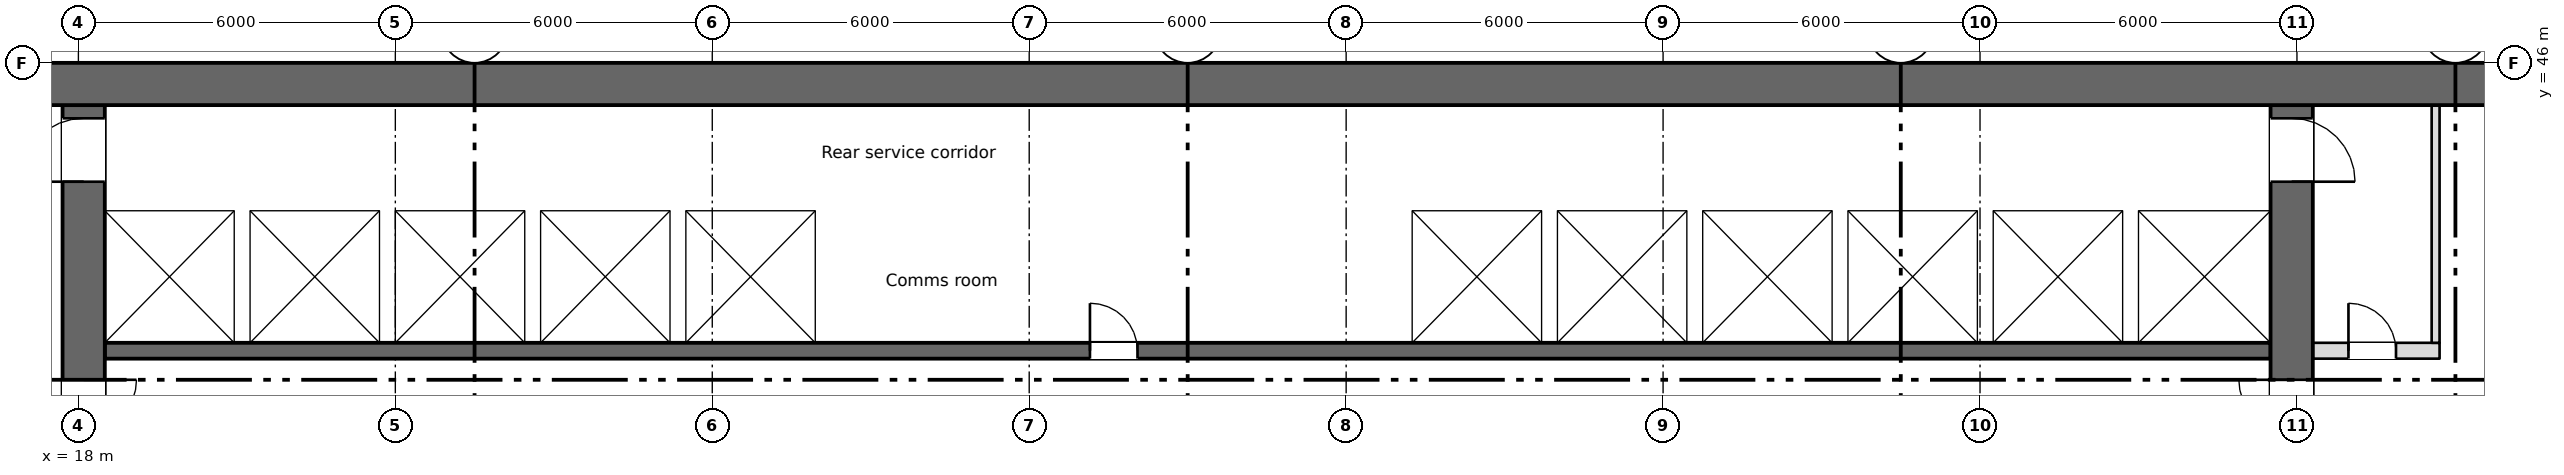
"""IFC4 building model, lengths in metres.
Left out: names, types, materials, properties, quantities, classifications, styles, units other than length and angle.
Written with IfcOpenShell. Run it as: python <this file> out.ifc"""

import sys

from ifc_helpers import new_model, si_unit, direction, frame, frame_2d, origin, place, context, subcontext, project, spatial, rectangle, extrude, element, fill, save


model = new_model("IFC4")
c1 = context("Model", 3, precision=1e-05, world=origin(), true_north=direction((0.0, 1.0)))
c2 = subcontext(c1, "Body", "Model", "MODEL_VIEW")
j1 = project(units=[si_unit("LENGTHUNIT", "METRE"), si_unit("PLANEANGLEUNIT", "RADIAN")], contexts=[c1])
p1 = place(None, origin())
s1 = spatial("IfcSite", under=j1, at=p1, CompositionType="ELEMENT")
p2 = place(p1, origin())
s2 = spatial("IfcBuilding", under=s1, at=p2, CompositionType="ELEMENT")
p3 = place(p2, frame((0.0, 0.0, 106.25)))
s3 = spatial("IfcBuildingStorey", under=s2, at=p3, CompositionType="ELEMENT", Elevation=106.25)
p4 = place(p3, frame((5.55, 45.6, 0.0), z_axis=(0.0, 0.0, 1.0), x_axis=(1.0, 0.0, 0.0)))
e1 = element("IfcWall", 1, at=p4, inside=s3, PredefinedType="SHEAR", context=c2, shape_type="SweptSolid", body=[
    extrude(rectangle(XDim=60.9, YDim=0.8, at=frame_2d((30.45, 0.0))), origin(), (0.0, 0.0, 1.0), 3.35),
])
p5 = place(p4, frame((1.2, 0.0, 0.6)))
e2 = element("IfcOpeningElement", 2, at=p5, cuts=e1, PredefinedType="OPENING", context=c2, shape_type="SweptSolid", body=[
    extrude(rectangle(XDim=0.6, YDim=2.4, at=frame_2d((0.3, 1.2))), frame((0.0, 0.41, 0.0), z_axis=(0.0, -1.0, 0.0), x_axis=(1.0, 0.0, 0.0)), (0.0, 0.0, 1.0), 0.82),
])
p6 = place(p4, frame((7.2, 0.0, 0.6)))
e3 = element("IfcOpeningElement", 3, at=p6, cuts=e1, PredefinedType="OPENING", context=c2, shape_type="SweptSolid", body=[
    extrude(rectangle(XDim=0.6, YDim=2.4, at=frame_2d((0.3, 1.2))), frame((0.0, 0.41, 0.0), z_axis=(0.0, -1.0, 0.0), x_axis=(1.0, 0.0, 0.0)), (0.0, 0.0, 1.0), 0.82),
])
p7 = place(p3, frame((18.1, 28.4, 0.0), z_axis=(0.0, 0.0, 1.0), x_axis=(0.0, 1.0, 0.0)))
e4 = element("IfcWall", 4, at=p7, inside=s3, PredefinedType="SHEAR", context=c2, shape_type="SweptSolid", body=[
    extrude(rectangle(XDim=16.8, YDim=0.8, at=frame_2d((8.4, 0.0))), origin(), (0.0, 0.0, 1.0), 3.35),
])
p8 = place(p7, frame((9.6, 0.0, 0.0)))
e5 = element("IfcOpeningElement", 5, at=p8, cuts=e4, PredefinedType="OPENING", context=c2, shape_type="SweptSolid", body=[
    extrude(rectangle(XDim=2.0, YDim=2.1, at=frame_2d((1.0, 1.05))), frame((0.0, 0.41, 0.0), z_axis=(0.0, -1.0, 0.0), x_axis=(1.0, 0.0, 0.0)), (0.0, 0.0, 1.0), 0.82),
])
p9 = place(p7, frame((15.35, 0.0, 0.0)))
e6 = element("IfcOpeningElement", 6, at=p9, cuts=e4, PredefinedType="OPENING", context=c2, shape_type="SweptSolid", body=[
    extrude(rectangle(XDim=1.2, YDim=2.1, at=frame_2d((0.6, 1.05))), frame((0.0, 0.41, 0.0), z_axis=(0.0, -1.0, 0.0), x_axis=(1.0, 0.0, 0.0)), (0.0, 0.0, 1.0), 0.82),
])
p10 = place(p3, frame((59.9, 28.4, 0.0), z_axis=(0.0, 0.0, 1.0), x_axis=(0.0, 1.0, 0.0)))
e7 = element("IfcWall", 7, at=p10, inside=s3, PredefinedType="SHEAR", context=c2, shape_type="SweptSolid", body=[
    extrude(rectangle(XDim=16.8, YDim=0.8, at=frame_2d((8.4, 0.0))), origin(), (0.0, 0.0, 1.0), 3.35),
])
p11 = place(p10, frame((9.6, 0.0, 0.0)))
e8 = element("IfcOpeningElement", 8, at=p11, cuts=e7, PredefinedType="OPENING", context=c2, shape_type="SweptSolid", body=[
    extrude(rectangle(XDim=2.0, YDim=2.1, at=frame_2d((1.0, 1.05))), frame((0.0, 0.41, 0.0), z_axis=(0.0, -1.0, 0.0), x_axis=(1.0, 0.0, 0.0)), (0.0, 0.0, 1.0), 0.82),
])
p12 = place(p10, frame((15.35, 0.0, 0.0)))
e9 = element("IfcOpeningElement", 9, at=p12, cuts=e7, PredefinedType="OPENING", context=c2, shape_type="SweptSolid", body=[
    extrude(rectangle(XDim=1.2, YDim=2.1, at=frame_2d((0.6, 1.05))), frame((0.0, 0.41, 0.0), z_axis=(0.0, -1.0, 0.0), x_axis=(1.0, 0.0, 0.0)), (0.0, 0.0, 1.0), 0.82),
])
p13 = place(p3, frame((18.5, 40.55, 0.0), z_axis=(0.0, 0.0, 1.0), x_axis=(1.0, 0.0, 0.0)))
e10 = element("IfcWall", 10, at=p13, inside=s3, PredefinedType="SHEAR", context=c2, shape_type="SweptSolid", body=[
    extrude(rectangle(XDim=41.0, YDim=0.3, at=frame_2d((20.5, 0.0))), origin(), (0.0, 0.0, 1.0), 3.35),
])
p14 = place(p13, frame((18.65, 0.0, 0.0)))
e11 = element("IfcOpeningElement", 11, at=p14, cuts=e10, PredefinedType="OPENING", context=c2, shape_type="SweptSolid", body=[
    extrude(rectangle(XDim=0.9, YDim=2.1, at=frame_2d((0.45, 1.05))), frame((0.0, 0.16, 0.0), z_axis=(0.0, -1.0, 0.0), x_axis=(1.0, 0.0, 0.0)), (0.0, 0.0, 1.0), 0.32),
])
p15 = place(p13, frame((6.175, 0.0, 0.0)))
e12 = element("IfcOpeningElement", 12, at=p15, cuts=e10, PredefinedType="OPENING", context=c2, shape_type="SweptSolid", body=[
    extrude(rectangle(XDim=1.1, YDim=2.1, at=frame_2d((0.55, 1.05))), frame((0.0, 0.16, 0.0), z_axis=(0.0, -1.0, 0.0), x_axis=(1.0, 0.0, 0.0)), (0.0, 0.0, 1.0), 0.32),
])
p16 = place(p13, frame((8.925, 0.0, 0.0)))
e13 = element("IfcOpeningElement", 13, at=p16, cuts=e10, PredefinedType="OPENING", context=c2, shape_type="SweptSolid", body=[
    extrude(rectangle(XDim=1.1, YDim=2.1, at=frame_2d((0.55, 1.05))), frame((0.0, 0.16, 0.0), z_axis=(0.0, -1.0, 0.0), x_axis=(1.0, 0.0, 0.0)), (0.0, 0.0, 1.0), 0.32),
])
p17 = place(p13, frame((11.675, 0.0, 0.0)))
e14 = element("IfcOpeningElement", 14, at=p17, cuts=e10, PredefinedType="OPENING", context=c2, shape_type="SweptSolid", body=[
    extrude(rectangle(XDim=1.1, YDim=2.1, at=frame_2d((0.55, 1.05))), frame((0.0, 0.16, 0.0), z_axis=(0.0, -1.0, 0.0), x_axis=(1.0, 0.0, 0.0)), (0.0, 0.0, 1.0), 0.32),
])
p18 = place(p13, frame((30.925, 0.0, 0.0)))
e15 = element("IfcOpeningElement", 15, at=p18, cuts=e10, PredefinedType="OPENING", context=c2, shape_type="SweptSolid", body=[
    extrude(rectangle(XDim=1.1, YDim=2.1, at=frame_2d((0.55, 1.05))), frame((0.0, 0.16, 0.0), z_axis=(0.0, -1.0, 0.0), x_axis=(1.0, 0.0, 0.0)), (0.0, 0.0, 1.0), 0.32),
])
p19 = place(p13, frame((33.675, 0.0, 0.0)))
e16 = element("IfcOpeningElement", 16, at=p19, cuts=e10, PredefinedType="OPENING", context=c2, shape_type="SweptSolid", body=[
    extrude(rectangle(XDim=1.1, YDim=2.1, at=frame_2d((0.55, 1.05))), frame((0.0, 0.16, 0.0), z_axis=(0.0, -1.0, 0.0), x_axis=(1.0, 0.0, 0.0)), (0.0, 0.0, 1.0), 0.32),
])
p20 = place(p13, frame((36.375, 0.0, 0.0)))
e17 = element("IfcOpeningElement", 17, at=p20, cuts=e10, PredefinedType="OPENING", context=c2, shape_type="SweptSolid", body=[
    extrude(rectangle(XDim=1.2, YDim=2.1, at=frame_2d((0.6, 1.05))), frame((0.0, 0.16, 0.0), z_axis=(0.0, -1.0, 0.0), x_axis=(1.0, 0.0, 0.0)), (0.0, 0.0, 1.0), 0.32),
])
p21 = place(p13, frame((39.15, 0.0, 0.0)))
e18 = element("IfcOpeningElement", 18, at=p21, cuts=e10, PredefinedType="OPENING", context=c2, shape_type="SweptSolid", body=[
    extrude(rectangle(XDim=1.2, YDim=2.1, at=frame_2d((0.6, 1.05))), frame((0.0, 0.16, 0.0), z_axis=(0.0, -1.0, 0.0), x_axis=(1.0, 0.0, 0.0)), (0.0, 0.0, 1.0), 0.32),
])
p22 = place(p3, frame((18.5, 43.35, 0.0), z_axis=(0.0, 0.0, 1.0), x_axis=(1.0, 0.0, 0.0)))
e19 = element("IfcWall", 19, at=p22, inside=s3, PredefinedType="SHEAR", context=c2, shape_type="SweptSolid", body=[
    extrude(rectangle(XDim=41.0, YDim=0.3, at=frame_2d((20.5, 0.0))), origin(), (0.0, 0.0, 1.0), 3.35),
])
p23 = place(p3, frame((60.3, 40.55, 0.0), z_axis=(0.0, 0.0, 1.0), x_axis=(1.0, 0.0, 0.0)))
e20 = element("IfcWall", 20, at=p23, inside=s3, PredefinedType="PARTITIONING", context=c2, shape_type="SweptSolid", body=[
    extrude(rectangle(XDim=2.4, YDim=0.3, at=frame_2d((1.2, 0.0))), origin(), (0.0, 0.0, 1.0), 3.35),
])
p24 = place(p23, frame((0.675, 0.0, 0.0)))
e21 = element("IfcOpeningElement", 21, at=p24, cuts=e20, PredefinedType="OPENING", context=c2, shape_type="SweptSolid", body=[
    extrude(rectangle(XDim=0.9, YDim=2.1, at=frame_2d((0.45, 1.05))), frame((0.0, 0.16, 0.0), z_axis=(0.0, -1.0, 0.0), x_axis=(1.0, 0.0, 0.0)), (0.0, 0.0, 1.0), 0.32),
])
for number, where, z_axis, x_axis in (
    (22, (21.1, 40.7, 0.0), (0.0, 0.0, 1.0), (0.0, 1.0, 0.0)),
    (23, (23.85, 40.7, 0.0), (0.0, 0.0, 1.0), (0.0, 1.0, 0.0)),
    (24, (26.6, 40.7, 0.0), (0.0, 0.0, 1.0), (0.0, 1.0, 0.0)),
    (25, (29.35, 40.7, 0.0), (0.0, 0.0, 1.0), (0.0, 1.0, 0.0)),
    (26, (32.1, 40.7, 0.0), (0.0, 0.0, 1.0), (0.0, 1.0, 0.0)),
    (27, (43.1, 40.7, 0.0), (0.0, 0.0, 1.0), (0.0, 1.0, 0.0)),
    (28, (45.85, 40.7, 0.0), (0.0, 0.0, 1.0), (0.0, 1.0, 0.0)),
    (29, (48.6, 40.7, 0.0), (0.0, 0.0, 1.0), (0.0, 1.0, 0.0)),
    (30, (51.35, 40.7, 0.0), (0.0, 0.0, 1.0), (0.0, 1.0, 0.0)),
    (31, (54.1, 40.7, 0.0), (0.0, 0.0, 1.0), (0.0, 1.0, 0.0)),
    (32, (56.85, 40.7, 0.0), (0.0, 0.0, 1.0), (0.0, 1.0, 0.0)),
):
    element("IfcWall", number, at=place(p3, frame(where, z_axis=z_axis, x_axis=x_axis)), inside=s3, PredefinedType="SHEAR", context=c2, shape_type="SweptSolid", body=[
        extrude(rectangle(XDim=2.5, YDim=0.3, at=frame_2d((1.25, 0.0))), origin(), (0.0, 0.0, 1.0), 3.35),
    ])
p25 = place(p3, frame((62.625, 40.7, 0.0), z_axis=(0.0, 0.0, 1.0), x_axis=(0.0, 1.0, 0.0)))
e33 = element("IfcWall", 33, at=p25, inside=s3, PredefinedType="PARTITIONING", context=c2, shape_type="SweptSolid", body=[
    extrude(rectangle(XDim=4.5, YDim=0.15, at=frame_2d((2.25, 0.0))), origin(), (0.0, 0.0, 1.0), 3.35),
])
p26 = place(p24, origin())
e34 = element("IfcDoor", 34, at=p26, inside=s3, OperationType="SINGLE_SWING_LEFT", PredefinedType="DOOR", context=c2, shape_type="SweptSolid", body=[
    extrude(rectangle(XDim=0.9, YDim=2.1, at=frame_2d((0.45, 1.05))), frame((0.0, 0.025, 0.0), z_axis=(0.0, -1.0, 0.0), x_axis=(1.0, 0.0, 0.0)), (0.0, 0.0, 1.0), 0.05),
])
fill(e21, e34)
p27 = place(p14, origin())
e35 = element("IfcDoor", 35, at=p27, inside=s3, OperationType="SINGLE_SWING_LEFT", PredefinedType="DOOR", context=c2, shape_type="SweptSolid", body=[
    extrude(rectangle(XDim=0.9, YDim=2.1, at=frame_2d((0.45, 1.05))), frame((0.0, 0.025, 0.0), z_axis=(0.0, -1.0, 0.0), x_axis=(1.0, 0.0, 0.0)), (0.0, 0.0, 1.0), 0.05),
])
fill(e11, e35)
p28 = place(p15, origin())
e36 = element("IfcDoor", 36, at=p28, inside=s3, OperationType="SLIDING_TO_LEFT", PredefinedType="DOOR", context=c2, shape_type="SweptSolid", body=[
    extrude(rectangle(XDim=1.1, YDim=2.1, at=frame_2d((0.55, 1.05))), frame((0.0, 0.025, 0.0), z_axis=(0.0, -1.0, 0.0), x_axis=(1.0, 0.0, 0.0)), (0.0, 0.0, 1.0), 0.05),
])
fill(e12, e36)
p29 = place(p16, origin())
e37 = element("IfcDoor", 37, at=p29, inside=s3, OperationType="SLIDING_TO_LEFT", PredefinedType="DOOR", context=c2, shape_type="SweptSolid", body=[
    extrude(rectangle(XDim=1.1, YDim=2.1, at=frame_2d((0.55, 1.05))), frame((0.0, 0.025, 0.0), z_axis=(0.0, -1.0, 0.0), x_axis=(1.0, 0.0, 0.0)), (0.0, 0.0, 1.0), 0.05),
])
fill(e13, e37)
p30 = place(p17, origin())
e38 = element("IfcDoor", 38, at=p30, inside=s3, OperationType="SLIDING_TO_LEFT", PredefinedType="DOOR", context=c2, shape_type="SweptSolid", body=[
    extrude(rectangle(XDim=1.1, YDim=2.1, at=frame_2d((0.55, 1.05))), frame((0.0, 0.025, 0.0), z_axis=(0.0, -1.0, 0.0), x_axis=(1.0, 0.0, 0.0)), (0.0, 0.0, 1.0), 0.05),
])
fill(e14, e38)
p31 = place(p18, origin())
e39 = element("IfcDoor", 39, at=p31, inside=s3, OperationType="SLIDING_TO_LEFT", PredefinedType="DOOR", context=c2, shape_type="SweptSolid", body=[
    extrude(rectangle(XDim=1.1, YDim=2.1, at=frame_2d((0.55, 1.05))), frame((0.0, 0.025, 0.0), z_axis=(0.0, -1.0, 0.0), x_axis=(1.0, 0.0, 0.0)), (0.0, 0.0, 1.0), 0.05),
])
fill(e15, e39)
p32 = place(p19, origin())
e40 = element("IfcDoor", 40, at=p32, inside=s3, OperationType="SLIDING_TO_LEFT", PredefinedType="DOOR", context=c2, shape_type="SweptSolid", body=[
    extrude(rectangle(XDim=1.1, YDim=2.1, at=frame_2d((0.55, 1.05))), frame((0.0, 0.025, 0.0), z_axis=(0.0, -1.0, 0.0), x_axis=(1.0, 0.0, 0.0)), (0.0, 0.0, 1.0), 0.05),
])
fill(e16, e40)
p33 = place(p20, origin())
e41 = element("IfcDoor", 41, at=p33, inside=s3, OperationType="SLIDING_TO_LEFT", PredefinedType="DOOR", context=c2, shape_type="SweptSolid", body=[
    extrude(rectangle(XDim=1.2, YDim=2.1, at=frame_2d((0.6, 1.05))), frame((0.0, 0.025, 0.0), z_axis=(0.0, -1.0, 0.0), x_axis=(1.0, 0.0, 0.0)), (0.0, 0.0, 1.0), 0.05),
])
fill(e17, e41)
p34 = place(p21, origin())
e42 = element("IfcDoor", 42, at=p34, inside=s3, OperationType="SLIDING_TO_LEFT", PredefinedType="DOOR", context=c2, shape_type="SweptSolid", body=[
    extrude(rectangle(XDim=1.2, YDim=2.1, at=frame_2d((0.6, 1.05))), frame((0.0, 0.025, 0.0), z_axis=(0.0, -1.0, 0.0), x_axis=(1.0, 0.0, 0.0)), (0.0, 0.0, 1.0), 0.05),
])
fill(e18, e42)
p35 = place(p8, origin())
e43 = element("IfcDoor", 43, at=p35, inside=s3, OperationType="DOUBLE_DOOR_SINGLE_SWING", PredefinedType="DOOR", context=c2, shape_type="SweptSolid", body=[
    extrude(rectangle(XDim=2.0, YDim=2.1, at=frame_2d((1.0, 1.05))), frame((0.0, 0.025, 0.0), z_axis=(0.0, -1.0, 0.0), x_axis=(1.0, 0.0, 0.0)), (0.0, 0.0, 1.0), 0.05),
])
fill(e5, e43)
p36 = place(p11, origin())
e44 = element("IfcDoor", 44, at=p36, inside=s3, OperationType="DOUBLE_DOOR_SINGLE_SWING", PredefinedType="DOOR", context=c2, shape_type="SweptSolid", body=[
    extrude(rectangle(XDim=2.0, YDim=2.1, at=frame_2d((1.0, 1.05))), frame((0.0, 0.025, 0.0), z_axis=(0.0, -1.0, 0.0), x_axis=(1.0, 0.0, 0.0)), (0.0, 0.0, 1.0), 0.05),
])
fill(e8, e44)
p37 = place(p9, origin())
e45 = element("IfcDoor", 45, at=p37, inside=s3, OperationType="SINGLE_SWING_LEFT", PredefinedType="DOOR", context=c2, shape_type="SweptSolid", body=[
    extrude(rectangle(XDim=1.2, YDim=2.1, at=frame_2d((0.6, 1.05))), frame((0.0, 0.025, 0.0), z_axis=(0.0, -1.0, 0.0), x_axis=(1.0, 0.0, 0.0)), (0.0, 0.0, 1.0), 0.05),
])
fill(e6, e45)
p38 = place(p12, origin())
e46 = element("IfcDoor", 46, at=p38, inside=s3, OperationType="SINGLE_SWING_LEFT", PredefinedType="DOOR", context=c2, shape_type="SweptSolid", body=[
    extrude(rectangle(XDim=1.2, YDim=2.1, at=frame_2d((0.6, 1.05))), frame((0.0, 0.025, 0.0), z_axis=(0.0, -1.0, 0.0), x_axis=(1.0, 0.0, 0.0)), (0.0, 0.0, 1.0), 0.05),
])
fill(e9, e46)
save(model, sys.argv[1])
